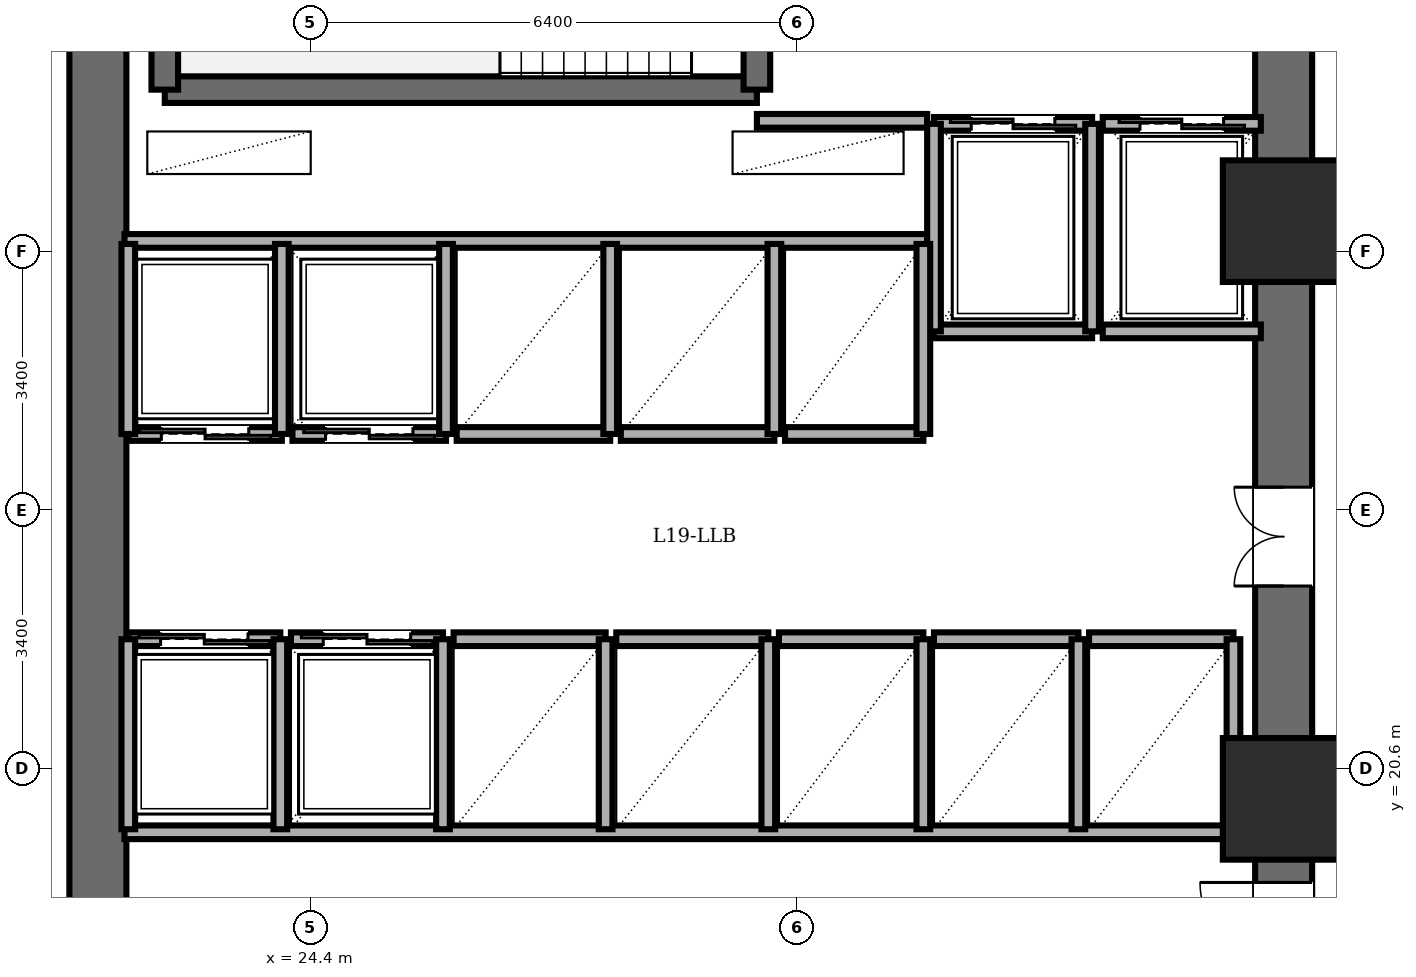
"""IFC4 building model, lengths in metres.
Left out: names, types, materials, properties, quantities, classifications, styles, units other than length and angle.
Written with IfcOpenShell. Run it as: python <this file> out.ifc"""

import sys

from ifc_helpers import new_model, si_unit, direction, frame, frame_2d, origin, origin_2d, place, context, subcontext, project, spatial, rectangle, extrude, element, fill, save


model = new_model("IFC4")
c1 = context("Model", 3, precision=1e-05, world=origin(), true_north=direction((0.0, 1.0)))
c2 = subcontext(c1, "Body", "Model", "MODEL_VIEW")
j1 = project(units=[si_unit("LENGTHUNIT", "METRE"), si_unit("PLANEANGLEUNIT", "RADIAN")], contexts=[c1])
p1 = place(None, origin())
s1 = spatial("IfcSite", under=j1, at=p1, CompositionType="ELEMENT")
p2 = place(p1, origin())
s2 = spatial("IfcBuilding", under=s1, at=p2, CompositionType="ELEMENT")
p3 = place(p2, frame((0.0, 0.0, 72.0)))
s3 = spatial("IfcBuildingStorey", under=s2, at=p3, CompositionType="ELEMENT", Elevation=72.0)
for number, where, z_axis, x_axis in (
    (1, (37.2, 20.2, 0.0), (0.0, 0.0, 1.0), (1.0, 0.0, 0.0)),
    (2, (37.2, 27.8, 0.0), (0.0, 0.0, 1.0), (1.0, 0.0, 0.0)),
):
    element("IfcColumn", number, at=place(p3, frame(where, z_axis=z_axis, x_axis=x_axis)), inside=s3, PredefinedType="COLUMN", context=c2, shape_type="SweptSolid", body=[
        extrude(rectangle(XDim=1.6, YDim=1.6, at=origin_2d()), origin(), (0.0, 0.0, 1.0), 3.6),
    ])
p4 = place(p3, frame((21.6, 14.4, 0.0), z_axis=(0.0, 0.0, 1.0), x_axis=(0.0, 1.0, 0.0)))
e3 = element("IfcWall", 3, at=p4, inside=s3, PredefinedType="SHEAR", context=c2, shape_type="SweptSolid", body=[
    extrude(rectangle(XDim=19.2, YDim=0.75, at=frame_2d((9.6, 0.0))), origin(), (0.0, 0.0, 1.0), 3.36),
])
p5 = place(p3, frame((37.2, 14.4, 0.0), z_axis=(0.0, 0.0, 1.0), x_axis=(0.0, 1.0, 0.0)))
e4 = element("IfcWall", 4, at=p5, inside=s3, PredefinedType="SHEAR", context=c2, shape_type="SweptSolid", body=[
    extrude(rectangle(XDim=19.2, YDim=0.75, at=frame_2d((9.6, 0.0))), origin(), (0.0, 0.0, 1.0), 3.36),
])
p6 = place(p5, frame((15.8, 0.0, 0.0)))
e5 = element("IfcOpeningElement", 5, at=p6, cuts=e4, PredefinedType="OPENING", context=c2, shape_type="SweptSolid", body=[
    extrude(rectangle(XDim=1.15, YDim=2.15, at=frame_2d((0.575, 1.075))), frame((0.0, 0.385, 0.0), z_axis=(0.0, -1.0, 0.0), x_axis=(1.0, 0.0, 0.0)), (0.0, 0.0, 1.0), 0.77),
])
p7 = place(p5, frame((3.6, 0.0, 0.0)))
e6 = element("IfcOpeningElement", 6, at=p7, cuts=e4, PredefinedType="OPENING", context=c2, shape_type="SweptSolid", body=[
    extrude(rectangle(XDim=1.1, YDim=2.15, at=frame_2d((0.55, 1.075))), frame((0.0, 0.385, 0.0), z_axis=(0.0, -1.0, 0.0), x_axis=(1.0, 0.0, 0.0)), (0.0, 0.0, 1.0), 0.77),
])
p8 = place(p5, frame((8.6, 0.0, 0.0)))
e7 = element("IfcOpeningElement", 7, at=p8, cuts=e4, PredefinedType="OPENING", context=c2, shape_type="SweptSolid", body=[
    extrude(rectangle(XDim=1.3, YDim=2.2, at=frame_2d((0.65, 1.1))), frame((0.0, 0.385, 0.0), z_axis=(0.0, -1.0, 0.0), x_axis=(1.0, 0.0, 0.0)), (0.0, 0.0, 1.0), 0.77),
])
p9 = place(p3, frame((22.48, 29.53, 0.0), z_axis=(0.0, 0.0, 1.0), x_axis=(1.0, 0.0, 0.0)))
e8 = element("IfcWall", 8, at=p9, inside=s3, PredefinedType="SOLIDWALL", context=c2, shape_type="SweptSolid", body=[
    extrude(rectangle(XDim=7.79, YDim=0.35, at=frame_2d((3.895, 0.0))), origin(), (0.0, 0.0, 1.0), 3.36),
])
p10 = place(p3, frame((22.48, 29.53, 0.0), z_axis=(0.0, 0.0, 1.0), x_axis=(0.0, 1.0, 0.0)))
e9 = element("IfcWall", 9, at=p10, inside=s3, PredefinedType="SOLIDWALL", context=c2, shape_type="SweptSolid", body=[
    extrude(rectangle(XDim=3.58, YDim=0.35, at=frame_2d((1.79, 0.0))), origin(), (0.0, 0.0, 1.0), 3.36),
])
p11 = place(p3, frame((30.27, 29.53, 0.0), z_axis=(0.0, 0.0, 1.0), x_axis=(0.0, 1.0, 0.0)))
e10 = element("IfcWall", 10, at=p11, inside=s3, PredefinedType="SOLIDWALL", context=c2, shape_type="SweptSolid", body=[
    extrude(rectangle(XDim=3.58, YDim=0.35, at=frame_2d((1.79, 0.0))), origin(), (0.0, 0.0, 1.0), 3.36),
])
p12 = place(p11, frame((1.25, 0.0, 0.0)))
e11 = element("IfcOpeningElement", 11, at=p12, cuts=e10, PredefinedType="OPENING", context=c2, shape_type="SweptSolid", body=[
    extrude(rectangle(XDim=1.1, YDim=2.15, at=frame_2d((0.55, 1.075))), frame((0.0, 0.185, 0.0), z_axis=(0.0, -1.0, 0.0), x_axis=(1.0, 0.0, 0.0)), (0.0, 0.0, 1.0), 0.37),
])
p13 = place(p3, frame((30.27, 29.12, 0.0), z_axis=(0.0, 0.0, 1.0), x_axis=(1.0, 0.0, 0.0)))
e12 = element("IfcWall", 12, at=p13, inside=s3, PredefinedType="PARTITIONING", context=c2, shape_type="SweptSolid", body=[
    extrude(rectangle(XDim=2.24, YDim=0.18, at=frame_2d((1.12, 0.0))), origin(), (0.0, 0.0, 1.0), 3.36),
])
p14 = place(p3, frame((21.95, 27.54, 0.0), z_axis=(0.0, 0.0, 1.0), x_axis=(1.0, 0.0, 0.0)))
e13 = element("IfcWall", 13, at=p14, inside=s3, PredefinedType="PARTITIONING", context=c2, shape_type="SweptSolid", body=[
    extrude(rectangle(XDim=10.56, YDim=0.18, at=frame_2d((5.28, 0.0))), origin(), (0.0, 0.0, 1.0), 3.36),
])
p15 = place(p3, frame((21.95, 19.76, 0.0), z_axis=(0.0, 0.0, 1.0), x_axis=(1.0, 0.0, 0.0)))
e14 = element("IfcWall", 14, at=p15, inside=s3, PredefinedType="PARTITIONING", context=c2, shape_type="SweptSolid", body=[
    extrude(rectangle(XDim=14.87, YDim=0.18, at=frame_2d((7.435, 0.0))), origin(), (0.0, 0.0, 1.0), 3.36),
])
p16 = place(p3, frame((32.6, 29.08, 0.0), z_axis=(0.0, 0.0, 1.0), x_axis=(1.0, 0.0, 0.0)))
e15 = element("IfcWall", 15, at=p16, inside=s3, PredefinedType="PARTITIONING", context=c2, shape_type="SweptSolid", body=[
    extrude(rectangle(XDim=2.08, YDim=0.18, at=frame_2d((1.04, 0.0))), origin(), (0.0, 0.0, 1.0), 3.36),
])
p17 = place(p16, frame((0.49, 0.0, 0.0)))
e16 = element("IfcOpeningElement", 16, at=p17, cuts=e15, PredefinedType="OPENING", context=c2, shape_type="SweptSolid", body=[
    extrude(rectangle(XDim=1.1, YDim=2.2, at=frame_2d((0.55, 1.1))), frame((0.0, 0.1, 0.0), z_axis=(0.0, -1.0, 0.0), x_axis=(1.0, 0.0, 0.0)), (0.0, 0.0, 1.0), 0.2),
])
p18 = place(p3, frame((34.68, 26.35, 0.0), z_axis=(0.0, 0.0, 1.0), x_axis=(-1.0, 0.0, 0.0)))
e17 = element("IfcWall", 17, at=p18, inside=s3, PredefinedType="PARTITIONING", context=c2, shape_type="SweptSolid", body=[
    extrude(rectangle(XDim=2.08, YDim=0.18, at=frame_2d((1.04, 0.0))), origin(), (0.0, 0.0, 1.0), 3.36),
])
for number, where, z_axis, x_axis in (
    (18, (34.68, 26.35, 0.0), (0.0, 0.0, 1.0), (0.0, 1.0, 0.0)),
    (19, (32.6, 29.08, 0.0), (0.0, 0.0, 1.0), (0.0, -1.0, 0.0)),
):
    element("IfcWall", number, at=place(p3, frame(where, z_axis=z_axis, x_axis=x_axis)), inside=s3, PredefinedType="PARTITIONING", context=c2, shape_type="SweptSolid", body=[
        extrude(rectangle(XDim=2.73, YDim=0.18, at=frame_2d((1.365, 0.0))), origin(), (0.0, 0.0, 1.0), 3.36),
    ])
p19 = place(p3, frame((34.82, 29.08, 0.0), z_axis=(0.0, 0.0, 1.0), x_axis=(1.0, 0.0, 0.0)))
e20 = element("IfcWall", 20, at=p19, inside=s3, PredefinedType="PARTITIONING", context=c2, shape_type="SweptSolid", body=[
    extrude(rectangle(XDim=2.08, YDim=0.18, at=frame_2d((1.04, 0.0))), origin(), (0.0, 0.0, 1.0), 3.36),
])
p20 = place(p19, frame((0.49, 0.0, 0.0)))
e21 = element("IfcOpeningElement", 21, at=p20, cuts=e20, PredefinedType="OPENING", context=c2, shape_type="SweptSolid", body=[
    extrude(rectangle(XDim=1.1, YDim=2.2, at=frame_2d((0.55, 1.1))), frame((0.0, 0.1, 0.0), z_axis=(0.0, -1.0, 0.0), x_axis=(1.0, 0.0, 0.0)), (0.0, 0.0, 1.0), 0.2),
])
p21 = place(p3, frame((36.9, 26.35, 0.0), z_axis=(0.0, 0.0, 1.0), x_axis=(-1.0, 0.0, 0.0)))
e22 = element("IfcWall", 22, at=p21, inside=s3, PredefinedType="PARTITIONING", context=c2, shape_type="SweptSolid", body=[
    extrude(rectangle(XDim=2.08, YDim=0.18, at=frame_2d((1.04, 0.0))), origin(), (0.0, 0.0, 1.0), 3.36),
])
p22 = place(p3, frame((24.02, 25.0, 0.0), z_axis=(0.0, 0.0, 1.0), x_axis=(-1.0, 0.0, 0.0)))
e23 = element("IfcWall", 23, at=p22, inside=s3, PredefinedType="PARTITIONING", context=c2, shape_type="SweptSolid", body=[
    extrude(rectangle(XDim=2.02, YDim=0.18, at=frame_2d((1.01, 0.0))), origin(), (0.0, 0.0, 1.0), 3.36),
])
p23 = place(p22, frame((0.435, 0.0, 0.0)))
e24 = element("IfcOpeningElement", 24, at=p23, cuts=e23, PredefinedType="OPENING", context=c2, shape_type="SweptSolid", body=[
    extrude(rectangle(XDim=1.15, YDim=2.2, at=frame_2d((0.575, 1.1))), frame((0.0, 0.1, 0.0), z_axis=(0.0, -1.0, 0.0), x_axis=(1.0, 0.0, 0.0)), (0.0, 0.0, 1.0), 0.2),
])
for number, where, z_axis, x_axis in (
    (25, (24.02, 25.0, 0.0), (0.0, 0.0, 1.0), (0.0, 1.0, 0.0)),
    (26, (22.0, 27.5, 0.0), (0.0, 0.0, 1.0), (0.0, -1.0, 0.0)),
):
    element("IfcWall", number, at=place(p3, frame(where, z_axis=z_axis, x_axis=x_axis)), inside=s3, PredefinedType="PARTITIONING", context=c2, shape_type="SweptSolid", body=[
        extrude(rectangle(XDim=2.5, YDim=0.18, at=frame_2d((1.25, 0.0))), origin(), (0.0, 0.0, 1.0), 3.36),
    ])
p24 = place(p3, frame((26.18, 25.0, 0.0), z_axis=(0.0, 0.0, 1.0), x_axis=(-1.0, 0.0, 0.0)))
e27 = element("IfcWall", 27, at=p24, inside=s3, PredefinedType="PARTITIONING", context=c2, shape_type="SweptSolid", body=[
    extrude(rectangle(XDim=2.02, YDim=0.18, at=frame_2d((1.01, 0.0))), origin(), (0.0, 0.0, 1.0), 3.36),
])
p25 = place(p24, frame((0.435, 0.0, 0.0)))
e28 = element("IfcOpeningElement", 28, at=p25, cuts=e27, PredefinedType="OPENING", context=c2, shape_type="SweptSolid", body=[
    extrude(rectangle(XDim=1.15, YDim=2.2, at=frame_2d((0.575, 1.1))), frame((0.0, 0.1, 0.0), z_axis=(0.0, -1.0, 0.0), x_axis=(1.0, 0.0, 0.0)), (0.0, 0.0, 1.0), 0.2),
])
p26 = place(p3, frame((26.18, 25.0, 0.0), z_axis=(0.0, 0.0, 1.0), x_axis=(0.0, 1.0, 0.0)))
e29 = element("IfcWall", 29, at=p26, inside=s3, PredefinedType="PARTITIONING", context=c2, shape_type="SweptSolid", body=[
    extrude(rectangle(XDim=2.5, YDim=0.18, at=frame_2d((1.25, 0.0))), origin(), (0.0, 0.0, 1.0), 3.36),
])
p27 = place(p3, frame((22.0, 22.3, 0.0), z_axis=(0.0, 0.0, 1.0), x_axis=(1.0, 0.0, 0.0)))
e30 = element("IfcWall", 30, at=p27, inside=s3, PredefinedType="PARTITIONING", context=c2, shape_type="SweptSolid", body=[
    extrude(rectangle(XDim=2.0, YDim=0.18, at=frame_2d((1.0, 0.0))), origin(), (0.0, 0.0, 1.0), 3.36),
])
p28 = place(p27, frame((0.425, 0.0, 0.0)))
e31 = element("IfcOpeningElement", 31, at=p28, cuts=e30, PredefinedType="OPENING", context=c2, shape_type="SweptSolid", body=[
    extrude(rectangle(XDim=1.15, YDim=2.2, at=frame_2d((0.575, 1.1))), frame((0.0, 0.1, 0.0), z_axis=(0.0, -1.0, 0.0), x_axis=(1.0, 0.0, 0.0)), (0.0, 0.0, 1.0), 0.2),
])
for number, where, z_axis, x_axis in (
    (32, (24.0, 19.8, 0.0), (0.0, 0.0, 1.0), (0.0, 1.0, 0.0)),
    (33, (22.0, 22.3, 0.0), (0.0, 0.0, 1.0), (0.0, -1.0, 0.0)),
):
    element("IfcWall", number, at=place(p3, frame(where, z_axis=z_axis, x_axis=x_axis)), inside=s3, PredefinedType="PARTITIONING", context=c2, shape_type="SweptSolid", body=[
        extrude(rectangle(XDim=2.5, YDim=0.18, at=frame_2d((1.25, 0.0))), origin(), (0.0, 0.0, 1.0), 3.36),
    ])
p29 = place(p3, frame((24.14, 22.3, 0.0), z_axis=(0.0, 0.0, 1.0), x_axis=(1.0, 0.0, 0.0)))
e34 = element("IfcWall", 34, at=p29, inside=s3, PredefinedType="PARTITIONING", context=c2, shape_type="SweptSolid", body=[
    extrude(rectangle(XDim=2.0, YDim=0.18, at=frame_2d((1.0, 0.0))), origin(), (0.0, 0.0, 1.0), 3.36),
])
p30 = place(p29, frame((0.425, 0.0, 0.0)))
e35 = element("IfcOpeningElement", 35, at=p30, cuts=e34, PredefinedType="OPENING", context=c2, shape_type="SweptSolid", body=[
    extrude(rectangle(XDim=1.15, YDim=2.2, at=frame_2d((0.575, 1.1))), frame((0.0, 0.1, 0.0), z_axis=(0.0, -1.0, 0.0), x_axis=(1.0, 0.0, 0.0)), (0.0, 0.0, 1.0), 0.2),
])
p31 = place(p3, frame((26.14, 19.8, 0.0), z_axis=(0.0, 0.0, 1.0), x_axis=(0.0, 1.0, 0.0)))
e36 = element("IfcWall", 36, at=p31, inside=s3, PredefinedType="PARTITIONING", context=c2, shape_type="SweptSolid", body=[
    extrude(rectangle(XDim=2.5, YDim=0.18, at=frame_2d((1.25, 0.0))), origin(), (0.0, 0.0, 1.0), 3.36),
])
p32 = place(p3, frame((28.34, 25.0, 0.0), z_axis=(0.0, 0.0, 1.0), x_axis=(-1.0, 0.0, 0.0)))
e37 = element("IfcWall", 37, at=p32, inside=s3, PredefinedType="PARTITIONING", context=c2, shape_type="SweptSolid", body=[
    extrude(rectangle(XDim=2.02, YDim=0.18, at=frame_2d((1.01, 0.0))), origin(), (0.0, 0.0, 1.0), 3.36),
])
p33 = place(p3, frame((28.34, 25.0, 0.0), z_axis=(0.0, 0.0, 1.0), x_axis=(0.0, 1.0, 0.0)))
e38 = element("IfcWall", 38, at=p33, inside=s3, PredefinedType="PARTITIONING", context=c2, shape_type="SweptSolid", body=[
    extrude(rectangle(XDim=2.5, YDim=0.18, at=frame_2d((1.25, 0.0))), origin(), (0.0, 0.0, 1.0), 3.36),
])
p34 = place(p3, frame((30.5, 25.0, 0.0), z_axis=(0.0, 0.0, 1.0), x_axis=(-1.0, 0.0, 0.0)))
e39 = element("IfcWall", 39, at=p34, inside=s3, PredefinedType="PARTITIONING", context=c2, shape_type="SweptSolid", body=[
    extrude(rectangle(XDim=2.02, YDim=0.18, at=frame_2d((1.01, 0.0))), origin(), (0.0, 0.0, 1.0), 3.36),
])
p35 = place(p3, frame((30.5, 25.0, 0.0), z_axis=(0.0, 0.0, 1.0), x_axis=(0.0, 1.0, 0.0)))
e40 = element("IfcWall", 40, at=p35, inside=s3, PredefinedType="PARTITIONING", context=c2, shape_type="SweptSolid", body=[
    extrude(rectangle(XDim=2.5, YDim=0.18, at=frame_2d((1.25, 0.0))), origin(), (0.0, 0.0, 1.0), 3.36),
])
p36 = place(p3, frame((26.28, 22.3, 0.0), z_axis=(0.0, 0.0, 1.0), x_axis=(1.0, 0.0, 0.0)))
e41 = element("IfcWall", 41, at=p36, inside=s3, PredefinedType="PARTITIONING", context=c2, shape_type="SweptSolid", body=[
    extrude(rectangle(XDim=2.0, YDim=0.18, at=frame_2d((1.0, 0.0))), origin(), (0.0, 0.0, 1.0), 3.36),
])
p37 = place(p3, frame((28.28, 19.8, 0.0), z_axis=(0.0, 0.0, 1.0), x_axis=(0.0, 1.0, 0.0)))
e42 = element("IfcWall", 42, at=p37, inside=s3, PredefinedType="PARTITIONING", context=c2, shape_type="SweptSolid", body=[
    extrude(rectangle(XDim=2.5, YDim=0.18, at=frame_2d((1.25, 0.0))), origin(), (0.0, 0.0, 1.0), 3.36),
])
p38 = place(p3, frame((28.42, 22.3, 0.0), z_axis=(0.0, 0.0, 1.0), x_axis=(1.0, 0.0, 0.0)))
e43 = element("IfcWall", 43, at=p38, inside=s3, PredefinedType="PARTITIONING", context=c2, shape_type="SweptSolid", body=[
    extrude(rectangle(XDim=2.0, YDim=0.18, at=frame_2d((1.0, 0.0))), origin(), (0.0, 0.0, 1.0), 3.36),
])
p39 = place(p3, frame((30.42, 19.8, 0.0), z_axis=(0.0, 0.0, 1.0), x_axis=(0.0, 1.0, 0.0)))
e44 = element("IfcWall", 44, at=p39, inside=s3, PredefinedType="PARTITIONING", context=c2, shape_type="SweptSolid", body=[
    extrude(rectangle(XDim=2.5, YDim=0.18, at=frame_2d((1.25, 0.0))), origin(), (0.0, 0.0, 1.0), 3.36),
])
p40 = place(p3, frame((32.46, 25.0, 0.0), z_axis=(0.0, 0.0, 1.0), x_axis=(-1.0, 0.0, 0.0)))
e45 = element("IfcWall", 45, at=p40, inside=s3, PredefinedType="PARTITIONING", context=c2, shape_type="SweptSolid", body=[
    extrude(rectangle(XDim=1.82, YDim=0.18, at=frame_2d((0.91, 0.0))), origin(), (0.0, 0.0, 1.0), 3.36),
])
p41 = place(p3, frame((32.46, 25.0, 0.0), z_axis=(0.0, 0.0, 1.0), x_axis=(0.0, 1.0, 0.0)))
e46 = element("IfcWall", 46, at=p41, inside=s3, PredefinedType="PARTITIONING", context=c2, shape_type="SweptSolid", body=[
    extrude(rectangle(XDim=2.5, YDim=0.18, at=frame_2d((1.25, 0.0))), origin(), (0.0, 0.0, 1.0), 3.36),
])
p42 = place(p3, frame((30.56, 22.3, 0.0), z_axis=(0.0, 0.0, 1.0), x_axis=(1.0, 0.0, 0.0)))
e47 = element("IfcWall", 47, at=p42, inside=s3, PredefinedType="PARTITIONING", context=c2, shape_type="SweptSolid", body=[
    extrude(rectangle(XDim=1.9, YDim=0.18, at=frame_2d((0.95, 0.0))), origin(), (0.0, 0.0, 1.0), 3.36),
])
p43 = place(p3, frame((32.46, 19.8, 0.0), z_axis=(0.0, 0.0, 1.0), x_axis=(0.0, 1.0, 0.0)))
e48 = element("IfcWall", 48, at=p43, inside=s3, PredefinedType="PARTITIONING", context=c2, shape_type="SweptSolid", body=[
    extrude(rectangle(XDim=2.5, YDim=0.18, at=frame_2d((1.25, 0.0))), origin(), (0.0, 0.0, 1.0), 3.36),
])
p44 = place(p3, frame((32.6, 22.3, 0.0), z_axis=(0.0, 0.0, 1.0), x_axis=(1.0, 0.0, 0.0)))
e49 = element("IfcWall", 49, at=p44, inside=s3, PredefinedType="PARTITIONING", context=c2, shape_type="SweptSolid", body=[
    extrude(rectangle(XDim=1.9, YDim=0.18, at=frame_2d((0.95, 0.0))), origin(), (0.0, 0.0, 1.0), 3.36),
])
p45 = place(p3, frame((34.5, 19.8, 0.0), z_axis=(0.0, 0.0, 1.0), x_axis=(0.0, 1.0, 0.0)))
e50 = element("IfcWall", 50, at=p45, inside=s3, PredefinedType="PARTITIONING", context=c2, shape_type="SweptSolid", body=[
    extrude(rectangle(XDim=2.5, YDim=0.18, at=frame_2d((1.25, 0.0))), origin(), (0.0, 0.0, 1.0), 3.36),
])
p46 = place(p3, frame((34.64, 22.3, 0.0), z_axis=(0.0, 0.0, 1.0), x_axis=(1.0, 0.0, 0.0)))
e51 = element("IfcWall", 51, at=p46, inside=s3, PredefinedType="PARTITIONING", context=c2, shape_type="SweptSolid", body=[
    extrude(rectangle(XDim=1.9, YDim=0.18, at=frame_2d((0.95, 0.0))), origin(), (0.0, 0.0, 1.0), 3.36),
])
p47 = place(p3, frame((36.54, 19.8, 0.0), z_axis=(0.0, 0.0, 1.0), x_axis=(0.0, 1.0, 0.0)))
e52 = element("IfcWall", 52, at=p47, inside=s3, PredefinedType="PARTITIONING", context=c2, shape_type="SweptSolid", body=[
    extrude(rectangle(XDim=2.5, YDim=0.18, at=frame_2d((1.25, 0.0))), origin(), (0.0, 0.0, 1.0), 3.36),
])
p48 = place(p7, origin())
e53 = element("IfcDoor", 53, at=p48, inside=s3, OperationType="SINGLE_SWING_RIGHT", PredefinedType="DOOR", context=c2, shape_type="SweptSolid", body=[
    extrude(rectangle(XDim=1.1, YDim=2.15, at=frame_2d((0.55, 1.075))), frame((0.0, 0.025, 0.0), z_axis=(0.0, -1.0, 0.0), x_axis=(1.0, 0.0, 0.0)), (0.0, 0.0, 1.0), 0.05),
])
fill(e6, e53)
p49 = place(p17, origin())
e54 = element("IfcDoor", 54, at=p49, inside=s3, OperationType="DOUBLE_DOOR_SLIDING", PredefinedType="DOOR", context=c2, shape_type="SweptSolid", body=[
    extrude(rectangle(XDim=1.1, YDim=2.2, at=frame_2d((0.55, 1.1))), frame((0.0, 0.025, 0.0), z_axis=(0.0, -1.0, 0.0), x_axis=(1.0, 0.0, 0.0)), (0.0, 0.0, 1.0), 0.05),
])
fill(e16, e54)
p50 = place(p20, origin())
e55 = element("IfcDoor", 55, at=p50, inside=s3, OperationType="DOUBLE_DOOR_SLIDING", PredefinedType="DOOR", context=c2, shape_type="SweptSolid", body=[
    extrude(rectangle(XDim=1.1, YDim=2.2, at=frame_2d((0.55, 1.1))), frame((0.0, 0.025, 0.0), z_axis=(0.0, -1.0, 0.0), x_axis=(1.0, 0.0, 0.0)), (0.0, 0.0, 1.0), 0.05),
])
fill(e21, e55)
p51 = place(p23, origin())
e56 = element("IfcDoor", 56, at=p51, inside=s3, OperationType="DOUBLE_DOOR_SLIDING", PredefinedType="DOOR", context=c2, shape_type="SweptSolid", body=[
    extrude(rectangle(XDim=1.15, YDim=2.2, at=frame_2d((0.575, 1.1))), frame((0.0, 0.025, 0.0), z_axis=(0.0, -1.0, 0.0), x_axis=(1.0, 0.0, 0.0)), (0.0, 0.0, 1.0), 0.05),
])
fill(e24, e56)
p52 = place(p25, origin())
e57 = element("IfcDoor", 57, at=p52, inside=s3, OperationType="DOUBLE_DOOR_SLIDING", PredefinedType="DOOR", context=c2, shape_type="SweptSolid", body=[
    extrude(rectangle(XDim=1.15, YDim=2.2, at=frame_2d((0.575, 1.1))), frame((0.0, 0.025, 0.0), z_axis=(0.0, -1.0, 0.0), x_axis=(1.0, 0.0, 0.0)), (0.0, 0.0, 1.0), 0.05),
])
fill(e28, e57)
p53 = place(p28, origin())
e58 = element("IfcDoor", 58, at=p53, inside=s3, OperationType="DOUBLE_DOOR_SLIDING", PredefinedType="DOOR", context=c2, shape_type="SweptSolid", body=[
    extrude(rectangle(XDim=1.15, YDim=2.2, at=frame_2d((0.575, 1.1))), frame((0.0, 0.025, 0.0), z_axis=(0.0, -1.0, 0.0), x_axis=(1.0, 0.0, 0.0)), (0.0, 0.0, 1.0), 0.05),
])
fill(e31, e58)
p54 = place(p30, origin())
e59 = element("IfcDoor", 59, at=p54, inside=s3, OperationType="DOUBLE_DOOR_SLIDING", PredefinedType="DOOR", context=c2, shape_type="SweptSolid", body=[
    extrude(rectangle(XDim=1.15, YDim=2.2, at=frame_2d((0.575, 1.1))), frame((0.0, 0.025, 0.0), z_axis=(0.0, -1.0, 0.0), x_axis=(1.0, 0.0, 0.0)), (0.0, 0.0, 1.0), 0.05),
])
fill(e35, e59)
p55 = place(p8, origin())
e60 = element("IfcDoor", 60, at=p55, inside=s3, OperationType="DOUBLE_DOOR_SINGLE_SWING", PredefinedType="DOOR", context=c2, shape_type="SweptSolid", body=[
    extrude(rectangle(XDim=1.3, YDim=2.2, at=frame_2d((0.65, 1.1))), frame((0.0, 0.025, 0.0), z_axis=(0.0, -1.0, 0.0), x_axis=(1.0, 0.0, 0.0)), (0.0, 0.0, 1.0), 0.05),
])
fill(e7, e60)
save(model, sys.argv[1])
